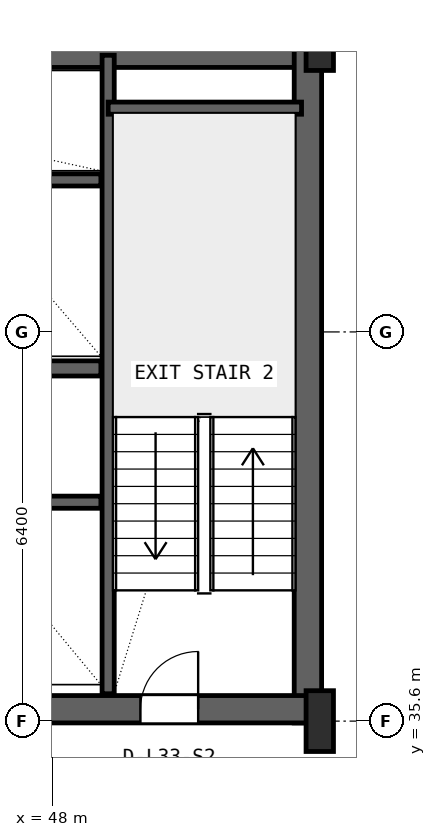
"""IFC4 building model, lengths in metres.
Left out: names, types, materials, properties, quantities, classifications, styles, units other than length and angle.
Written with IfcOpenShell. Run it as: python <this file> out.ifc"""

import sys

from ifc_helpers import new_model, si_unit, direction, frame, frame_2d, origin, origin_2d, place, context, subcontext, project, spatial, rectangle, i_section, extrude, source, transform, mapped, element, fill, save


model = new_model("IFC4")
c1 = context("Model", 3, precision=1e-05, world=origin(), true_north=direction((0.0, 1.0)))
c2 = subcontext(c1, "Body", "Model", "MODEL_VIEW")
j1 = project(units=[si_unit("LENGTHUNIT", "METRE"), si_unit("PLANEANGLEUNIT", "RADIAN")], contexts=[c1])
p1 = place(None, origin())
s1 = spatial("IfcSite", under=j1, at=p1, CompositionType="ELEMENT")
p2 = place(p1, origin())
s2 = spatial("IfcBuilding", under=s1, at=p2, CompositionType="ELEMENT")
p3 = place(p2, frame((0.0, 0.0, 137.2)))
s3 = spatial("IfcBuildingStorey", under=s2, at=p3, CompositionType="ELEMENT", Elevation=137.2)
p4 = place(p3, frame((15.6, 46.575, 0.0), z_axis=(0.0, 0.0, 1.0), x_axis=(1.0, 0.0, 0.0)))
e1 = element("IfcWall", 1, at=p4, inside=s3, PredefinedType="SHEAR", context=c2, shape_type="SweptSolid", body=[
    extrude(rectangle(XDim=36.8, YDim=0.45, at=frame_2d((18.4, 0.0))), origin(), (0.0, 0.0, 1.0), 3.48),
])
p5 = place(p3, frame((52.205, 35.57, 0.0), z_axis=(0.0, 0.0, 1.0), x_axis=(0.0, 1.0, 0.0)))
e2 = element("IfcWall", 2, at=p5, inside=s3, PredefinedType="SHEAR", context=c2, shape_type="SweptSolid", body=[
    extrude(rectangle(XDim=11.23, YDim=0.45, at=frame_2d((5.615, 0.0))), origin(), (0.0, 0.0, 1.0), 3.48),
])
p6 = place(p3, frame((43.2, 35.795, 0.0), z_axis=(0.0, 0.0, 1.0), x_axis=(1.0, 0.0, 0.0)))
e3 = element("IfcWall", 3, at=p6, inside=s3, PredefinedType="SHEAR", context=c2, shape_type="SweptSolid", body=[
    extrude(rectangle(XDim=9.23, YDim=0.45, at=frame_2d((4.615, 0.0))), origin(), (0.0, 0.0, 1.0), 3.48),
])
p7 = place(p6, frame((6.25, 0.0, 0.0)))
e4 = element("IfcOpeningElement", 4, at=p7, cuts=e3, PredefinedType="OPENING", context=c2, shape_type="SweptSolid", body=[
    extrude(rectangle(XDim=0.95, YDim=2.1, at=frame_2d((0.475, 1.05))), frame((0.0, 0.235, 0.0), z_axis=(0.0, -1.0, 0.0), x_axis=(1.0, 0.0, 0.0)), (0.0, 0.0, 1.0), 0.47),
])
m1 = source(origin(), c2, "Body", "SweptSolid", [
    extrude(i_section(OverallWidth=0.45, OverallDepth=1.0, WebThickness=0.016, FlangeThickness=0.03, FilletRadius=0.016, at=origin_2d()), origin(), (0.0, 0.0, 1.0), 3.8),
])
for number, where, z_axis, x_axis in (
    (5, (52.4, 35.6, 0.0), (0.0, 0.0, 1.0), (1.0, 0.0, 0.0)),
    (6, (52.4, 46.8, 0.0), (0.0, 0.0, 1.0), (1.0, 0.0, 0.0)),
):
    element("IfcColumn", number, at=place(p3, frame(where, z_axis=z_axis, x_axis=x_axis)), inside=s3, PredefinedType="COLUMN", context=c2, shape_type="MappedRepresentation", body=[
        mapped(m1, transform((0.0, 0.0, 0.0), x_axis=(1.0, 0.0, 0.0), y_axis=(0.0, 1.0, 0.0), z_axis=(0.0, 0.0, 1.0), scale=1.0)),
    ])
p8 = place(p3, frame((48.92, 36.05, 0.0), z_axis=(0.0, 0.0, 1.0), x_axis=(0.0, 1.0, 0.0)))
e7 = element("IfcWall", 7, at=p8, inside=s3, PredefinedType="SHEAR", context=c2, shape_type="SweptSolid", body=[
    extrude(rectangle(XDim=10.5, YDim=0.2, at=frame_2d((5.25, 0.0))), origin(), (0.0, 0.0, 1.0), 3.48),
])
p9 = place(p3, frame((48.92, 45.68, 0.0), z_axis=(0.0, 0.0, 1.0), x_axis=(1.0, 0.0, 0.0)))
e8 = element("IfcWall", 8, at=p9, inside=s3, PredefinedType="SHEAR", context=c2, shape_type="SweptSolid", body=[
    extrude(rectangle(XDim=3.18, YDim=0.2, at=frame_2d((1.59, 0.0))), origin(), (0.0, 0.0, 1.0), 3.48),
])
p10 = place(p3, frame((24.98, 41.4, 0.0), z_axis=(0.0, 0.0, 1.0), x_axis=(1.0, 0.0, 0.0)))
e9 = element("IfcWall", 9, at=p10, inside=s3, PredefinedType="SHEAR", context=c2, shape_type="SweptSolid", body=[
    extrude(rectangle(XDim=23.82, YDim=0.25, at=frame_2d((11.91, 0.0))), origin(), (0.0, 0.0, 1.0), 3.48),
])
p11 = place(p10, frame((8.87, 0.0, 0.0)))
e10 = element("IfcOpeningElement", 10, at=p11, cuts=e9, PredefinedType="OPENING", context=c2, shape_type="SweptSolid", body=[
    extrude(rectangle(XDim=1.1, YDim=2.18, at=frame_2d((0.55, 1.09))), frame((0.0, 0.135, 0.0), z_axis=(0.0, -1.0, 0.0), x_axis=(1.0, 0.0, 0.0)), (0.0, 0.0, 1.0), 0.27),
])
p12 = place(p10, frame((11.47, 0.0, 0.0)))
e11 = element("IfcOpeningElement", 11, at=p12, cuts=e9, PredefinedType="OPENING", context=c2, shape_type="SweptSolid", body=[
    extrude(rectangle(XDim=1.1, YDim=2.18, at=frame_2d((0.55, 1.09))), frame((0.0, 0.135, 0.0), z_axis=(0.0, -1.0, 0.0), x_axis=(1.0, 0.0, 0.0)), (0.0, 0.0, 1.0), 0.27),
])
p13 = place(p10, frame((14.07, 0.0, 0.0)))
e12 = element("IfcOpeningElement", 12, at=p13, cuts=e9, PredefinedType="OPENING", context=c2, shape_type="SweptSolid", body=[
    extrude(rectangle(XDim=1.1, YDim=2.18, at=frame_2d((0.55, 1.09))), frame((0.0, 0.135, 0.0), z_axis=(0.0, -1.0, 0.0), x_axis=(1.0, 0.0, 0.0)), (0.0, 0.0, 1.0), 0.27),
])
p14 = place(p10, frame((0.96, 0.0, 0.0)))
e13 = element("IfcOpeningElement", 13, at=p14, cuts=e9, PredefinedType="OPENING", context=c2, shape_type="SweptSolid", body=[
    extrude(rectangle(XDim=1.0, YDim=2.08, at=frame_2d((0.5, 1.04))), frame((0.0, 0.135, 0.0), z_axis=(0.0, -1.0, 0.0), x_axis=(1.0, 0.0, 0.0)), (0.0, 0.0, 1.0), 0.27),
])
p15 = place(p10, frame((3.56, 0.0, 0.0)))
e14 = element("IfcOpeningElement", 14, at=p15, cuts=e9, PredefinedType="OPENING", context=c2, shape_type="SweptSolid", body=[
    extrude(rectangle(XDim=1.0, YDim=2.08, at=frame_2d((0.5, 1.04))), frame((0.0, 0.135, 0.0), z_axis=(0.0, -1.0, 0.0), x_axis=(1.0, 0.0, 0.0)), (0.0, 0.0, 1.0), 0.27),
])
p16 = place(p10, frame((6.16, 0.0, 0.0)))
e15 = element("IfcOpeningElement", 15, at=p16, cuts=e9, PredefinedType="OPENING", context=c2, shape_type="SweptSolid", body=[
    extrude(rectangle(XDim=0.92, YDim=2.08, at=frame_2d((0.46, 1.04))), frame((0.0, 0.135, 0.0), z_axis=(0.0, -1.0, 0.0), x_axis=(1.0, 0.0, 0.0)), (0.0, 0.0, 1.0), 0.27),
])
p17 = place(p3, frame((41.22, 44.5, 0.0), z_axis=(0.0, 0.0, 1.0), x_axis=(1.0, 0.0, 0.0)))
e16 = element("IfcWall", 16, at=p17, inside=s3, PredefinedType="SHEAR", context=c2, shape_type="SweptSolid", body=[
    extrude(rectangle(XDim=7.58, YDim=0.2, at=frame_2d((3.79, 0.0))), origin(), (0.0, 0.0, 1.0), 3.48),
])
p18 = place(p3, frame((43.65, 39.2, 0.0), z_axis=(0.0, 0.0, 1.0), x_axis=(1.0, 0.0, 0.0)))
e17 = element("IfcWall", 17, at=p18, inside=s3, PredefinedType="SHEAR", context=c2, shape_type="SweptSolid", body=[
    extrude(rectangle(XDim=5.15, YDim=0.2, at=frame_2d((2.575, 0.0))), origin(), (0.0, 0.0, 1.0), 3.48),
])
m2 = source(origin(), c2, "Body", "SweptSolid", [
    extrude(rectangle(XDim=0.95, YDim=2.1, at=frame_2d((0.475, 1.05))), frame((0.0, 0.025, 0.0), z_axis=(0.0, -1.0, 0.0), x_axis=(1.0, 0.0, 0.0)), (0.0, 0.0, 1.0), 0.05),
])
p19 = place(p7, origin())
e18 = element("IfcDoor", 18, at=p19, inside=s3, OperationType="SINGLE_SWING_RIGHT", PredefinedType="DOOR", context=c2, shape_type="MappedRepresentation", body=[
    mapped(m2, transform((0.0, 0.0, 0.0), x_axis=(1.0, 0.0, 0.0), y_axis=(0.0, 1.0, 0.0), z_axis=(0.0, 0.0, 1.0), scale=1.0)),
])
fill(e4, e18)
save(model, sys.argv[1])
